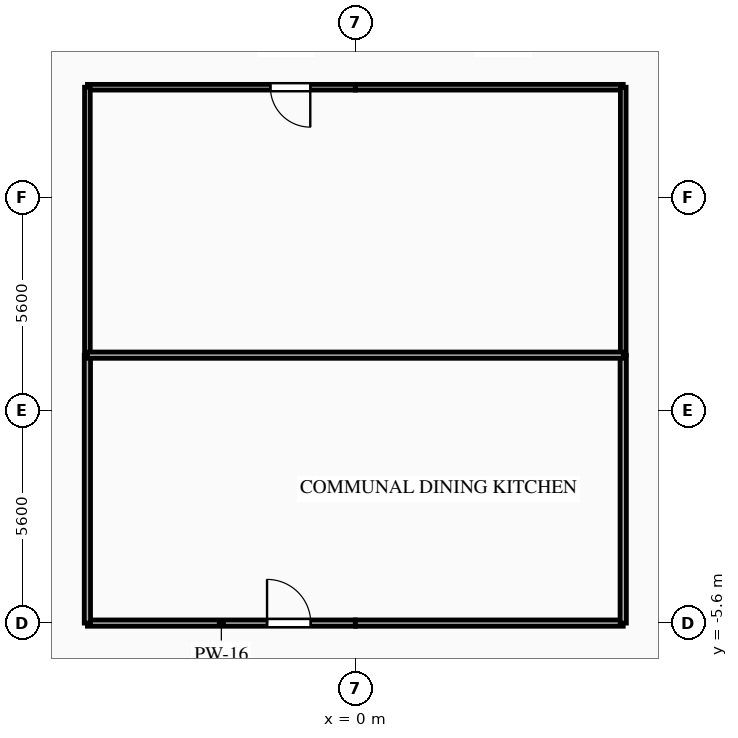
"""IFC4 building model, lengths in metres.
Left out: names, types, materials, properties, quantities, classifications, styles, units other than length and angle.
Written with IfcOpenShell. Run it as: python <this file> out.ifc"""

import sys

from ifc_helpers import new_model, si_unit, direction, frame, frame_2d, origin, place, context, subcontext, project, spatial, rectangle, extrude, element, fill, save


model = new_model("IFC4")
c1 = context("Model", 3, precision=1e-05, world=origin(), true_north=direction((0.0, 1.0)))
c2 = subcontext(c1, "Body", "Model", "MODEL_VIEW")
j1 = project(units=[si_unit("LENGTHUNIT", "METRE"), si_unit("PLANEANGLEUNIT", "RADIAN")], contexts=[c1])
p1 = place(None, origin())
s1 = spatial("IfcSite", under=j1, at=p1, CompositionType="ELEMENT")
p2 = place(p1, origin())
s2 = spatial("IfcBuilding", under=s1, at=p2, CompositionType="ELEMENT")
p3 = place(p2, frame((0.0, 0.0, 47.1)))
s3 = spatial("IfcBuildingStorey", under=s2, at=p3, CompositionType="ELEMENT", Elevation=47.1)
p4 = place(p3, frame((0.0, 8.5, 0.0), z_axis=(0.0, 0.0, 1.0), x_axis=(-1.0, 0.0, 0.0)))
e1 = element("IfcWall", 1, at=p4, inside=s3, PredefinedType="PARTITIONING", context=c2, shape_type="SweptSolid", body=[
    extrude(rectangle(XDim=7.05, YDim=0.15, at=frame_2d((3.525, 0.0))), origin(), (0.0, 0.0, 1.0), 3.035),
])
p5 = place(p4, frame((1.185, 0.0, 0.0)))
e2 = element("IfcOpeningElement", 2, at=p5, cuts=e1, PredefinedType="OPENING", context=c2, shape_type="SweptSolid", body=[
    extrude(rectangle(XDim=1.05, YDim=2.15, at=frame_2d((0.525, 1.075))), frame((0.0, 0.085, 0.0), z_axis=(0.0, -1.0, 0.0), x_axis=(1.0, 0.0, 0.0)), (0.0, 0.0, 1.0), 0.17),
])
p6 = place(p3, frame((7.05, 8.5, 0.0), z_axis=(0.0, 0.0, 1.0), x_axis=(-1.0, 0.0, 0.0)))
e3 = element("IfcWall", 3, at=p6, inside=s3, PredefinedType="PARTITIONING", context=c2, shape_type="SweptSolid", body=[
    extrude(rectangle(XDim=7.05, YDim=0.15, at=frame_2d((3.525, 0.0))), origin(), (0.0, 0.0, 1.0), 3.035),
])
p7 = place(p3, frame((-7.05, -5.6, 0.0), z_axis=(0.0, 0.0, 1.0), x_axis=(1.0, 0.0, 0.0)))
e4 = element("IfcWall", 4, at=p7, inside=s3, PredefinedType="PARTITIONING", context=c2, shape_type="SweptSolid", body=[
    extrude(rectangle(XDim=7.05, YDim=0.165, at=frame_2d((3.525, 0.0))), origin(), (0.0, 0.0, 1.0), 2.52),
])
p8 = place(p7, frame((4.728, 0.0, 0.0)))
e5 = element("IfcOpeningElement", 5, at=p8, cuts=e4, PredefinedType="OPENING", context=c2, shape_type="SweptSolid", body=[
    extrude(rectangle(XDim=1.15, YDim=2.15, at=frame_2d((0.575, 1.075))), frame((0.0, 0.093, 0.0), z_axis=(0.0, -1.0, 0.0), x_axis=(1.0, 0.0, 0.0)), (0.0, 0.0, 1.0), 0.185),
])
p9 = place(p3, frame((0.0, -5.6, 0.0), z_axis=(0.0, 0.0, 1.0), x_axis=(1.0, 0.0, 0.0)))
e6 = element("IfcWall", 6, at=p9, inside=s3, PredefinedType="PARTITIONING", context=c2, shape_type="SweptSolid", body=[
    extrude(rectangle(XDim=7.05, YDim=0.165, at=frame_2d((3.525, 0.0))), origin(), (0.0, 0.0, 1.0), 2.52),
])
p10 = place(p3, frame((-7.05, 1.45, 0.0), z_axis=(0.0, 0.0, 1.0), x_axis=(0.0, -1.0, 0.0)))
e7 = element("IfcWall", 7, at=p10, inside=s3, PredefinedType="PARTITIONING", context=c2, shape_type="SweptSolid", body=[
    extrude(rectangle(XDim=7.05, YDim=0.165, at=frame_2d((3.525, 0.0))), origin(), (0.0, 0.0, 1.0), 3.035),
])
p11 = place(p3, frame((-7.05, 8.5, 0.0), z_axis=(0.0, 0.0, 1.0), x_axis=(0.0, -1.0, 0.0)))
e8 = element("IfcWall", 8, at=p11, inside=s3, PredefinedType="PARTITIONING", context=c2, shape_type="SweptSolid", body=[
    extrude(rectangle(XDim=7.05, YDim=0.15, at=frame_2d((3.525, 0.0))), origin(), (0.0, 0.0, 1.0), 3.035),
])
p12 = place(p3, frame((7.05, -5.6, 0.0), z_axis=(0.0, 0.0, 1.0), x_axis=(0.0, 1.0, 0.0)))
e9 = element("IfcWall", 9, at=p12, inside=s3, PredefinedType="PARTITIONING", context=c2, shape_type="SweptSolid", body=[
    extrude(rectangle(XDim=7.05, YDim=0.165, at=frame_2d((3.525, 0.0))), origin(), (0.0, 0.0, 1.0), 3.035),
])
p13 = place(p3, frame((7.05, 1.45, 0.0), z_axis=(0.0, 0.0, 1.0), x_axis=(0.0, 1.0, 0.0)))
e10 = element("IfcWall", 10, at=p13, inside=s3, PredefinedType="PARTITIONING", context=c2, shape_type="SweptSolid", body=[
    extrude(rectangle(XDim=7.05, YDim=0.15, at=frame_2d((3.525, 0.0))), origin(), (0.0, 0.0, 1.0), 3.035),
])
p14 = place(p3, frame((-7.05, 1.45, 0.0), z_axis=(0.0, 0.0, 1.0), x_axis=(1.0, 0.0, 0.0)))
e11 = element("IfcWall", 11, at=p14, inside=s3, PredefinedType="PARTITIONING", context=c2, shape_type="SweptSolid", body=[
    extrude(rectangle(XDim=14.1, YDim=0.165, at=frame_2d((7.05, 0.0))), origin(), (0.0, 0.0, 1.0), 3.035),
])
p15 = place(p5, origin())
e12 = element("IfcDoor", 12, at=p15, inside=s3, OperationType="SINGLE_SWING_LEFT", PredefinedType="DOOR", context=c2, shape_type="SweptSolid", body=[
    extrude(rectangle(XDim=1.05, YDim=2.15, at=frame_2d((0.525, 1.075))), frame((0.0, 0.025, 0.0), z_axis=(0.0, -1.0, 0.0), x_axis=(1.0, 0.0, 0.0)), (0.0, 0.0, 1.0), 0.05),
])
fill(e2, e12)
p16 = place(p8, origin())
e13 = element("IfcDoor", 13, at=p16, inside=s3, OperationType="SINGLE_SWING_LEFT", PredefinedType="DOOR", context=c2, shape_type="SweptSolid", body=[
    extrude(rectangle(XDim=1.15, YDim=2.15, at=frame_2d((0.575, 1.075))), frame((0.0, 0.025, 0.0), z_axis=(0.0, -1.0, 0.0), x_axis=(1.0, 0.0, 0.0)), (0.0, 0.0, 1.0), 0.05),
])
fill(e5, e13)
save(model, sys.argv[1])
